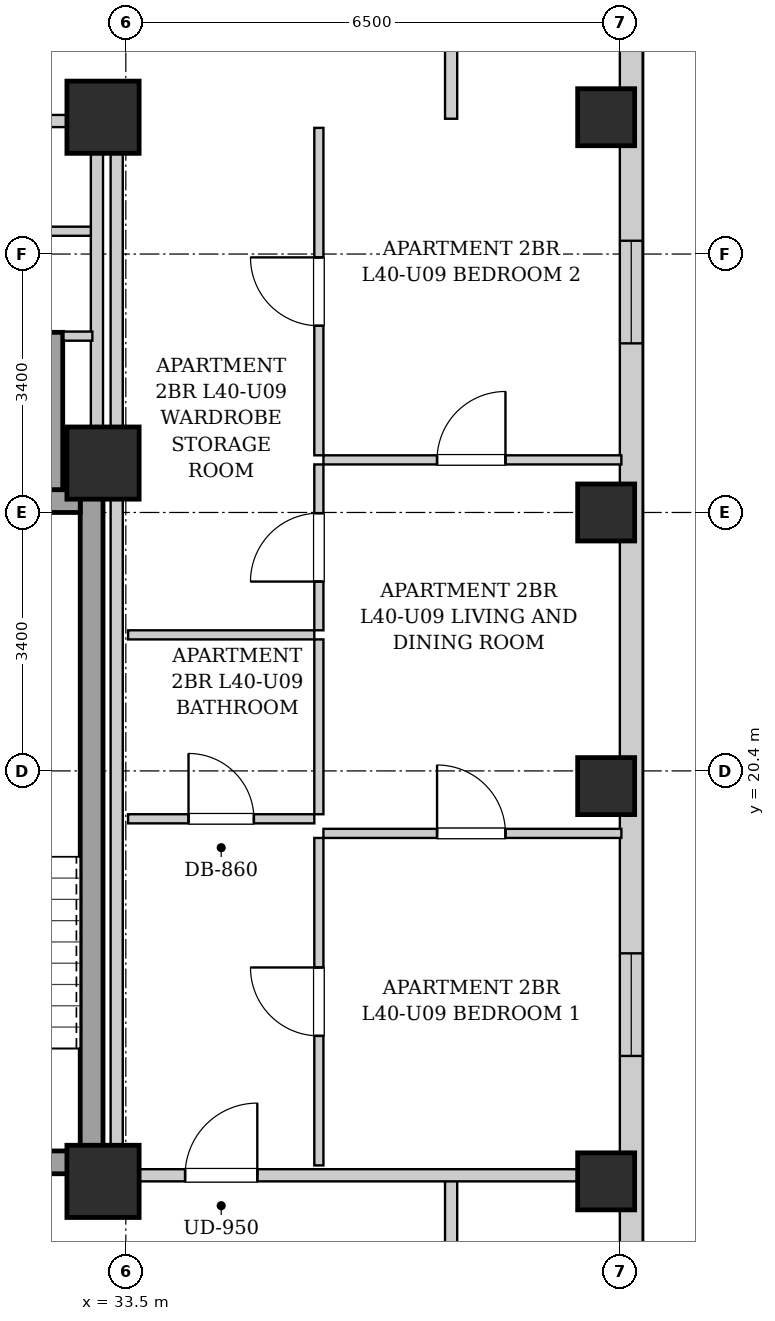
"""IFC4 building model, lengths in metres.
Left out: names, types, materials, properties, quantities, classifications, styles, units other than length and angle.
Written with IfcOpenShell. Run it as: python <this file> out.ifc"""

import sys

from ifc_helpers import new_model, si_unit, direction, frame, frame_2d, origin, origin_2d, place, context, subcontext, project, spatial, rectangle, extrude, element, fill, save


model = new_model("IFC4")
c1 = context("Model", 3, precision=1e-05, world=origin(), true_north=direction((0.0, 1.0)))
c2 = subcontext(c1, "Body", "Model", "MODEL_VIEW")
j1 = project(units=[si_unit("LENGTHUNIT", "METRE"), si_unit("PLANEANGLEUNIT", "RADIAN")], contexts=[c1])
p1 = place(None, origin())
s1 = spatial("IfcSite", under=j1, at=p1, CompositionType="ELEMENT")
p2 = place(p1, origin())
s2 = spatial("IfcBuilding", under=s1, at=p2, CompositionType="ELEMENT")
p3 = place(p2, frame((0.0, 0.0, 140.65)))
s3 = spatial("IfcBuildingStorey", under=s2, at=p3, CompositionType="ELEMENT", Elevation=140.65)
for number, where, z_axis, x_axis in (
    (1, (39.82, 15.0, 0.0), (0.0, 0.0, 1.0), (1.0, 0.0, 0.0)),
    (2, (39.82, 20.2, 0.0), (0.0, 0.0, 1.0), (1.0, 0.0, 0.0)),
    (3, (39.82, 23.8, 0.0), (0.0, 0.0, 1.0), (1.0, 0.0, 0.0)),
    (4, (39.82, 29.0, 0.0), (0.0, 0.0, 1.0), (1.0, 0.0, 0.0)),
):
    element("IfcColumn", number, at=place(p3, frame(where, z_axis=z_axis, x_axis=x_axis)), inside=s3, PredefinedType="COLUMN", context=c2, shape_type="SweptSolid", body=[
        extrude(rectangle(XDim=0.75, YDim=0.75, at=origin_2d()), origin(), (0.0, 0.0, 1.0), 3.25),
    ])
for number, where, z_axis, x_axis in (
    (5, (33.2, 15.0, 0.0), (0.0, 0.0, 1.0), (1.0, 0.0, 0.0)),
    (6, (33.2, 29.0, 0.0), (0.0, 0.0, 1.0), (1.0, 0.0, 0.0)),
    (7, (33.2, 24.45, 0.0), (0.0, 0.0, 1.0), (1.0, 0.0, 0.0)),
):
    element("IfcColumn", number, at=place(p3, frame(where, z_axis=z_axis, x_axis=x_axis)), inside=s3, PredefinedType="COLUMN", context=c2, shape_type="SweptSolid", body=[
        extrude(rectangle(XDim=0.95, YDim=0.95, at=origin_2d()), origin(), (0.0, 0.0, 1.0), 3.25),
    ])
p4 = place(p3, frame((40.15, 40.8, 0.0), z_axis=(0.0, 0.0, 1.0), x_axis=(0.0, -1.0, 0.0)))
e8 = element("IfcWall", 8, at=p4, inside=s3, PredefinedType="SOLIDWALL", context=c2, shape_type="SweptSolid", body=[
    extrude(rectangle(XDim=34.5, YDim=0.3, at=frame_2d((17.25, 0.0))), origin(), (0.0, 0.0, 1.0), 2.99),
])
p5 = place(p4, frame((31.575, 0.0, 0.55)))
e9 = element("IfcOpeningElement", 9, at=p5, cuts=e8, PredefinedType="OPENING", context=c2, shape_type="SweptSolid", body=[
    extrude(rectangle(XDim=1.35, YDim=1.2, at=frame_2d((0.675, 0.6))), frame((0.0, 0.16, 0.0), z_axis=(0.0, -1.0, 0.0), x_axis=(1.0, 0.0, 0.0)), (0.0, 0.0, 1.0), 0.32),
])
p6 = place(p4, frame((3.075, 0.0, 0.55)))
e10 = element("IfcOpeningElement", 10, at=p6, cuts=e8, PredefinedType="OPENING", context=c2, shape_type="SweptSolid", body=[
    extrude(rectangle(XDim=1.35, YDim=1.2, at=frame_2d((0.675, 0.6))), frame((0.0, 0.16, 0.0), z_axis=(0.0, -1.0, 0.0), x_axis=(1.0, 0.0, 0.0)), (0.0, 0.0, 1.0), 0.32),
])
p7 = place(p4, frame((1.085, 0.0, 0.55)))
e11 = element("IfcOpeningElement", 11, at=p7, cuts=e8, PredefinedType="OPENING", context=c2, shape_type="SweptSolid", body=[
    extrude(rectangle(XDim=1.35, YDim=1.2, at=frame_2d((0.675, 0.6))), frame((0.0, 0.16, 0.0), z_axis=(0.0, -1.0, 0.0), x_axis=(1.0, 0.0, 0.0)), (0.0, 0.0, 1.0), 0.32),
])
p8 = place(p4, frame((22.8, 0.0, 0.55)))
e12 = element("IfcOpeningElement", 12, at=p8, cuts=e8, PredefinedType="OPENING", context=c2, shape_type="SweptSolid", body=[
    extrude(rectangle(XDim=1.35, YDim=1.2, at=frame_2d((0.675, 0.6))), frame((0.0, 0.16, 0.0), z_axis=(0.0, -1.0, 0.0), x_axis=(1.0, 0.0, 0.0)), (0.0, 0.0, 1.0), 0.32),
])
p9 = place(p4, frame((13.425, 0.0, 0.55)))
e13 = element("IfcOpeningElement", 13, at=p9, cuts=e8, PredefinedType="OPENING", context=c2, shape_type="SweptSolid", body=[
    extrude(rectangle(XDim=1.35, YDim=1.2, at=frame_2d((0.675, 0.6))), frame((0.0, 0.16, 0.0), z_axis=(0.0, -1.0, 0.0), x_axis=(1.0, 0.0, 0.0)), (0.0, 0.0, 1.0), 0.32),
])
p10 = place(p3, frame((33.05, 15.1, 0.0), z_axis=(0.0, 0.0, 1.0), x_axis=(0.0, 1.0, 0.0)))
e14 = element("IfcWall", 14, at=p10, inside=s3, PredefinedType="SHEAR", context=c2, shape_type="SweptSolid", body=[
    extrude(rectangle(XDim=9.0, YDim=0.3, at=frame_2d((4.5, 0.0))), origin(), (0.0, 0.0, 1.0), 2.99),
])
p11 = place(p3, frame((30.05, 23.95, 0.0), z_axis=(0.0, 0.0, 1.0), x_axis=(1.0, 0.0, 0.0)))
e15 = element("IfcWall", 15, at=p11, inside=s3, PredefinedType="SHEAR", context=c2, shape_type="SweptSolid", body=[
    extrude(rectangle(XDim=2.85, YDim=0.3, at=frame_2d((1.425, 0.0))), origin(), (0.0, 0.0, 1.0), 2.99),
])
p12 = place(p3, frame((30.05, 15.25, 0.0), z_axis=(0.0, 0.0, 1.0), x_axis=(1.0, 0.0, 0.0)))
e16 = element("IfcWall", 16, at=p12, inside=s3, PredefinedType="SHEAR", context=c2, shape_type="SweptSolid", body=[
    extrude(rectangle(XDim=2.85, YDim=0.3, at=frame_2d((1.425, 0.0))), origin(), (0.0, 0.0, 1.0), 2.99),
])
p13 = place(p12, frame((0.86, 0.0, 0.0)))
e17 = element("IfcOpeningElement", 17, at=p13, cuts=e16, PredefinedType="OPENING", context=c2, shape_type="SweptSolid", body=[
    extrude(rectangle(XDim=1.1, YDim=2.05, at=frame_2d((0.55, 1.025))), frame((0.0, 0.16, 0.0), z_axis=(0.0, -1.0, 0.0), x_axis=(1.0, 0.0, 0.0)), (0.0, 0.0, 1.0), 0.32),
])
p14 = place(p3, frame((32.56, 24.1, 0.0), z_axis=(0.0, 0.0, 1.0), x_axis=(0.0, 1.0, 0.0)))
e18 = element("IfcWall", 18, at=p14, inside=s3, PredefinedType="SHEAR", context=c2, shape_type="SweptSolid", body=[
    extrude(rectangle(XDim=2.07, YDim=0.22, at=frame_2d((1.035, 0.0))), origin(), (0.0, 0.0, 1.0), 2.99),
])
p15 = place(p3, frame((33.12, 24.12, 0.0), z_axis=(0.0, 0.0, 1.0), x_axis=(0.0, 1.0, 0.0)))
e19 = element("IfcWall", 19, at=p15, inside=s3, PredefinedType="PARTITIONING", context=c2, shape_type="SweptSolid", body=[
    extrude(rectangle(XDim=4.76, YDim=0.16, at=frame_2d((2.38, 0.0))), origin(), (0.0, 0.0, 1.0), 2.99),
])
p16 = place(p3, frame((32.68, 26.12, 0.0), z_axis=(0.0, 0.0, 1.0), x_axis=(1.0, 0.0, 0.0)))
e20 = element("IfcWall", 20, at=p16, inside=s3, PredefinedType="PARTITIONING", context=c2, shape_type="SweptSolid", body=[
    extrude(rectangle(XDim=0.38, YDim=0.12, at=frame_2d((0.19, 0.0))), origin(), (0.0, 0.0, 1.0), 2.99),
])
p17 = place(p3, frame((30.12, 27.5, 0.0), z_axis=(0.0, 0.0, 1.0), x_axis=(1.0, 0.0, 0.0)))
e21 = element("IfcWall", 21, at=p17, inside=s3, PredefinedType="PARTITIONING", context=c2, shape_type="SweptSolid", body=[
    extrude(rectangle(XDim=2.92, YDim=0.12, at=frame_2d((1.46, 0.0))), origin(), (0.0, 0.0, 1.0), 2.99),
])
p18 = place(p17, frame((0.97, 0.0, 0.0)))
e22 = element("IfcOpeningElement", 22, at=p18, cuts=e21, PredefinedType="OPENING", context=c2, shape_type="SweptSolid", body=[
    extrude(rectangle(XDim=0.86, YDim=2.05, at=frame_2d((0.43, 1.025))), frame((0.0, 0.07, 0.0), z_axis=(0.0, -1.0, 0.0), x_axis=(1.0, 0.0, 0.0)), (0.0, 0.0, 1.0), 0.14),
])
p19 = place(p3, frame((25.72, 28.95, 0.0), z_axis=(0.0, 0.0, 1.0), x_axis=(1.0, 0.0, 0.0)))
e23 = element("IfcWall", 23, at=p19, inside=s3, PredefinedType="PARTITIONING", context=c2, shape_type="SweptSolid", body=[
    extrude(rectangle(XDim=7.32, YDim=0.16, at=frame_2d((3.66, 0.0))), origin(), (0.0, 0.0, 1.0), 2.426),
])
p20 = place(p19, frame((1.27, 0.0, 0.0)))
e24 = element("IfcOpeningElement", 24, at=p20, cuts=e23, PredefinedType="OPENING", context=c2, shape_type="SweptSolid", body=[
    extrude(rectangle(XDim=0.86, YDim=2.05, at=frame_2d((0.43, 1.025))), frame((0.0, 0.09, 0.0), z_axis=(0.0, -1.0, 0.0), x_axis=(1.0, 0.0, 0.0)), (0.0, 0.0, 1.0), 0.18),
])
for number, where, z_axis, x_axis in (
    (25, (37.78, 13.35, 0.0), (0.0, 0.0, 1.0), (0.0, 1.0, 0.0)),
    (26, (37.78, 28.98, 0.0), (0.0, 0.0, 1.0), (0.0, 1.0, 0.0)),
):
    element("IfcWall", number, at=place(p3, frame(where, z_axis=z_axis, x_axis=x_axis)), inside=s3, PredefinedType="PARTITIONING", context=c2, shape_type="SweptSolid", body=[
        extrude(rectangle(XDim=1.74, YDim=0.16, at=frame_2d((0.87, 0.0))), origin(), (0.0, 0.0, 1.0), 2.99),
    ])
p21 = place(p3, frame((33.38, 15.08, 0.0), z_axis=(0.0, 0.0, 1.0), x_axis=(1.0, 0.0, 0.0)))
e27 = element("IfcWall", 27, at=p21, inside=s3, PredefinedType="PARTITIONING", context=c2, shape_type="SweptSolid", body=[
    extrude(rectangle(XDim=6.64, YDim=0.16, at=frame_2d((3.32, 0.0))), origin(), (0.0, 0.0, 1.0), 2.426),
])
p22 = place(p21, frame((0.9, 0.0, 0.0)))
e28 = element("IfcOpeningElement", 28, at=p22, cuts=e27, PredefinedType="OPENING", context=c2, shape_type="SweptSolid", body=[
    extrude(rectangle(XDim=0.95, YDim=2.1, at=frame_2d((0.475, 1.05))), frame((0.0, 0.09, 0.0), z_axis=(0.0, -1.0, 0.0), x_axis=(1.0, 0.0, 0.0)), (0.0, 0.0, 1.0), 0.18),
])
p23 = place(p3, frame((33.53, 22.19, 0.0), z_axis=(0.0, 0.0, 1.0), x_axis=(1.0, 0.0, 0.0)))
e29 = element("IfcWall", 29, at=p23, inside=s3, PredefinedType="PARTITIONING", context=c2, shape_type="SweptSolid", body=[
    extrude(rectangle(XDim=2.45, YDim=0.12, at=frame_2d((1.225, 0.0))), origin(), (0.0, 0.0, 1.0), 2.99),
])
p24 = place(p3, frame((36.04, 22.25, 0.0), z_axis=(0.0, 0.0, 1.0), x_axis=(0.0, 1.0, 0.0)))
e30 = element("IfcWall", 30, at=p24, inside=s3, PredefinedType="PARTITIONING", context=c2, shape_type="SweptSolid", body=[
    extrude(rectangle(XDim=2.182, YDim=0.12, at=frame_2d((1.091, 0.0))), origin(), (0.0, 0.0, 1.0), 2.99),
])
p25 = place(p24, frame((0.641, 0.0, 0.0)))
e31 = element("IfcOpeningElement", 31, at=p25, cuts=e30, PredefinedType="OPENING", context=c2, shape_type="SweptSolid", body=[
    extrude(rectangle(XDim=0.9, YDim=2.05, at=frame_2d((0.45, 1.025))), frame((0.0, 0.07, 0.0), z_axis=(0.0, -1.0, 0.0), x_axis=(1.0, 0.0, 0.0)), (0.0, 0.0, 1.0), 0.14),
])
p26 = place(p3, frame((36.04, 24.552, 0.0), z_axis=(0.0, 0.0, 1.0), x_axis=(0.0, 1.0, 0.0)))
e32 = element("IfcWall", 32, at=p26, inside=s3, PredefinedType="PARTITIONING", context=c2, shape_type="SweptSolid", body=[
    extrude(rectangle(XDim=4.308, YDim=0.12, at=frame_2d((2.154, 0.0))), origin(), (0.0, 0.0, 1.0), 2.99),
])
p27 = place(p26, frame((1.704, 0.0, 0.0)))
e33 = element("IfcOpeningElement", 33, at=p27, cuts=e32, PredefinedType="OPENING", context=c2, shape_type="SweptSolid", body=[
    extrude(rectangle(XDim=0.9, YDim=2.05, at=frame_2d((0.45, 1.025))), frame((0.0, 0.07, 0.0), z_axis=(0.0, -1.0, 0.0), x_axis=(1.0, 0.0, 0.0)), (0.0, 0.0, 1.0), 0.14),
])
p28 = place(p3, frame((33.53, 19.77, 0.0), z_axis=(0.0, 0.0, 1.0), x_axis=(1.0, 0.0, 0.0)))
e34 = element("IfcWall", 34, at=p28, inside=s3, PredefinedType="PARTITIONING", context=c2, shape_type="SweptSolid", body=[
    extrude(rectangle(XDim=2.45, YDim=0.12, at=frame_2d((1.225, 0.0))), origin(), (0.0, 0.0, 1.0), 2.99),
])
p29 = place(p28, frame((0.795, 0.0, 0.0)))
e35 = element("IfcOpeningElement", 35, at=p29, cuts=e34, PredefinedType="OPENING", context=c2, shape_type="SweptSolid", body=[
    extrude(rectangle(XDim=0.86, YDim=2.05, at=frame_2d((0.43, 1.025))), frame((0.0, 0.07, 0.0), z_axis=(0.0, -1.0, 0.0), x_axis=(1.0, 0.0, 0.0)), (0.0, 0.0, 1.0), 0.14),
])
p30 = place(p3, frame((36.04, 19.83, 0.0), z_axis=(0.0, 0.0, 1.0), x_axis=(0.0, 1.0, 0.0)))
e36 = element("IfcWall", 36, at=p30, inside=s3, PredefinedType="PARTITIONING", context=c2, shape_type="SweptSolid", body=[
    extrude(rectangle(XDim=2.3, YDim=0.12, at=frame_2d((1.15, 0.0))), origin(), (0.0, 0.0, 1.0), 2.99),
])
p31 = place(p3, frame((36.04, 15.21, 0.0), z_axis=(0.0, 0.0, 1.0), x_axis=(0.0, 1.0, 0.0)))
e37 = element("IfcWall", 37, at=p31, inside=s3, PredefinedType="PARTITIONING", context=c2, shape_type="SweptSolid", body=[
    extrude(rectangle(XDim=4.308, YDim=0.12, at=frame_2d((2.154, 0.0))), origin(), (0.0, 0.0, 1.0), 2.99),
])
p32 = place(p31, frame((1.704, 0.0, 0.0)))
e38 = element("IfcOpeningElement", 38, at=p32, cuts=e37, PredefinedType="OPENING", context=c2, shape_type="SweptSolid", body=[
    extrude(rectangle(XDim=0.9, YDim=2.05, at=frame_2d((0.45, 1.025))), frame((0.0, 0.07, 0.0), z_axis=(0.0, -1.0, 0.0), x_axis=(1.0, 0.0, 0.0)), (0.0, 0.0, 1.0), 0.14),
])
p33 = place(p3, frame((36.1, 19.578, 0.0), z_axis=(0.0, 0.0, 1.0), x_axis=(1.0, 0.0, 0.0)))
e39 = element("IfcWall", 39, at=p33, inside=s3, PredefinedType="PARTITIONING", context=c2, shape_type="SweptSolid", body=[
    extrude(rectangle(XDim=3.92, YDim=0.12, at=frame_2d((1.96, 0.0))), origin(), (0.0, 0.0, 1.0), 2.99),
])
p34 = place(p33, frame((1.495, 0.0, 0.0)))
e40 = element("IfcOpeningElement", 40, at=p34, cuts=e39, PredefinedType="OPENING", context=c2, shape_type="SweptSolid", body=[
    extrude(rectangle(XDim=0.9, YDim=2.05, at=frame_2d((0.45, 1.025))), frame((0.0, 0.07, 0.0), z_axis=(0.0, -1.0, 0.0), x_axis=(1.0, 0.0, 0.0)), (0.0, 0.0, 1.0), 0.14),
])
p35 = place(p3, frame((36.1, 24.492, 0.0), z_axis=(0.0, 0.0, 1.0), x_axis=(1.0, 0.0, 0.0)))
e41 = element("IfcWall", 41, at=p35, inside=s3, PredefinedType="PARTITIONING", context=c2, shape_type="SweptSolid", body=[
    extrude(rectangle(XDim=3.92, YDim=0.12, at=frame_2d((1.96, 0.0))), origin(), (0.0, 0.0, 1.0), 2.621),
])
p36 = place(p35, frame((1.495, 0.0, 0.0)))
e42 = element("IfcOpeningElement", 42, at=p36, cuts=e41, PredefinedType="OPENING", context=c2, shape_type="SweptSolid", body=[
    extrude(rectangle(XDim=0.9, YDim=2.05, at=frame_2d((0.45, 1.025))), frame((0.0, 0.07, 0.0), z_axis=(0.0, -1.0, 0.0), x_axis=(1.0, 0.0, 0.0)), (0.0, 0.0, 1.0), 0.14),
])
p37 = place(p3, frame((33.38, 15.02, 0.0), z_axis=(0.0, 0.0, 1.0), x_axis=(0.0, 1.0, 0.0)))
e43 = element("IfcWall", 43, at=p37, inside=s3, PredefinedType="PARTITIONING", context=c2, shape_type="SweptSolid", body=[
    extrude(rectangle(XDim=13.98, YDim=0.16, at=frame_2d((6.99, 0.0))), origin(), (0.0, 0.0, 1.0), 2.99),
])
p38 = place(p22, origin())
e44 = element("IfcDoor", 44, at=p38, inside=s3, OperationType="SINGLE_SWING_RIGHT", PredefinedType="DOOR", context=c2, shape_type="SweptSolid", body=[
    extrude(rectangle(XDim=0.95, YDim=2.1, at=frame_2d((0.475, 1.05))), frame((0.0, 0.025, 0.0), z_axis=(0.0, -1.0, 0.0), x_axis=(1.0, 0.0, 0.0)), (0.0, 0.0, 1.0), 0.05),
])
fill(e28, e44)
p39 = place(p25, origin())
e45 = element("IfcDoor", 45, at=p39, inside=s3, OperationType="SINGLE_SWING_LEFT", PredefinedType="DOOR", context=c2, shape_type="SweptSolid", body=[
    extrude(rectangle(XDim=0.9, YDim=2.05, at=frame_2d((0.45, 1.025))), frame((0.0, 0.025, 0.0), z_axis=(0.0, -1.0, 0.0), x_axis=(1.0, 0.0, 0.0)), (0.0, 0.0, 1.0), 0.05),
])
fill(e31, e45)
p40 = place(p27, origin())
e46 = element("IfcDoor", 46, at=p40, inside=s3, OperationType="SINGLE_SWING_RIGHT", PredefinedType="DOOR", context=c2, shape_type="SweptSolid", body=[
    extrude(rectangle(XDim=0.9, YDim=2.05, at=frame_2d((0.45, 1.025))), frame((0.0, 0.025, 0.0), z_axis=(0.0, -1.0, 0.0), x_axis=(1.0, 0.0, 0.0)), (0.0, 0.0, 1.0), 0.05),
])
fill(e33, e46)
p41 = place(p29, origin())
e47 = element("IfcDoor", 47, at=p41, inside=s3, OperationType="SINGLE_SWING_LEFT", PredefinedType="DOOR", context=c2, shape_type="SweptSolid", body=[
    extrude(rectangle(XDim=0.86, YDim=2.05, at=frame_2d((0.43, 1.025))), frame((0.0, 0.025, 0.0), z_axis=(0.0, -1.0, 0.0), x_axis=(1.0, 0.0, 0.0)), (0.0, 0.0, 1.0), 0.05),
])
fill(e35, e47)
p42 = place(p32, origin())
e48 = element("IfcDoor", 48, at=p42, inside=s3, OperationType="SINGLE_SWING_RIGHT", PredefinedType="DOOR", context=c2, shape_type="SweptSolid", body=[
    extrude(rectangle(XDim=0.9, YDim=2.05, at=frame_2d((0.45, 1.025))), frame((0.0, 0.025, 0.0), z_axis=(0.0, -1.0, 0.0), x_axis=(1.0, 0.0, 0.0)), (0.0, 0.0, 1.0), 0.05),
])
fill(e38, e48)
p43 = place(p34, origin())
e49 = element("IfcDoor", 49, at=p43, inside=s3, OperationType="SINGLE_SWING_LEFT", PredefinedType="DOOR", context=c2, shape_type="SweptSolid", body=[
    extrude(rectangle(XDim=0.9, YDim=2.05, at=frame_2d((0.45, 1.025))), frame((0.0, 0.025, 0.0), z_axis=(0.0, -1.0, 0.0), x_axis=(1.0, 0.0, 0.0)), (0.0, 0.0, 1.0), 0.05),
])
fill(e40, e49)
p44 = place(p36, origin())
e50 = element("IfcDoor", 50, at=p44, inside=s3, OperationType="SINGLE_SWING_RIGHT", PredefinedType="DOOR", context=c2, shape_type="SweptSolid", body=[
    extrude(rectangle(XDim=0.9, YDim=2.05, at=frame_2d((0.45, 1.025))), frame((0.0, 0.025, 0.0), z_axis=(0.0, -1.0, 0.0), x_axis=(1.0, 0.0, 0.0)), (0.0, 0.0, 1.0), 0.05),
])
fill(e42, e50)
p45 = place(p8, origin())
e51 = element("IfcWindow", 51, at=p45, inside=s3, PartitioningType="SINGLE_PANEL", PredefinedType="WINDOW", context=c2, shape_type="SweptSolid", body=[
    extrude(rectangle(XDim=1.35, YDim=1.2, at=frame_2d((0.675, 0.6))), frame((0.0, 0.03, 0.0), z_axis=(0.0, -1.0, 0.0), x_axis=(1.0, 0.0, 0.0)), (0.0, 0.0, 1.0), 0.06),
])
fill(e12, e51)
p46 = place(p9, origin())
e52 = element("IfcWindow", 52, at=p46, inside=s3, PartitioningType="SINGLE_PANEL", PredefinedType="WINDOW", context=c2, shape_type="SweptSolid", body=[
    extrude(rectangle(XDim=1.35, YDim=1.2, at=frame_2d((0.675, 0.6))), frame((0.0, 0.03, 0.0), z_axis=(0.0, -1.0, 0.0), x_axis=(1.0, 0.0, 0.0)), (0.0, 0.0, 1.0), 0.06),
])
fill(e13, e52)
save(model, sys.argv[1])
